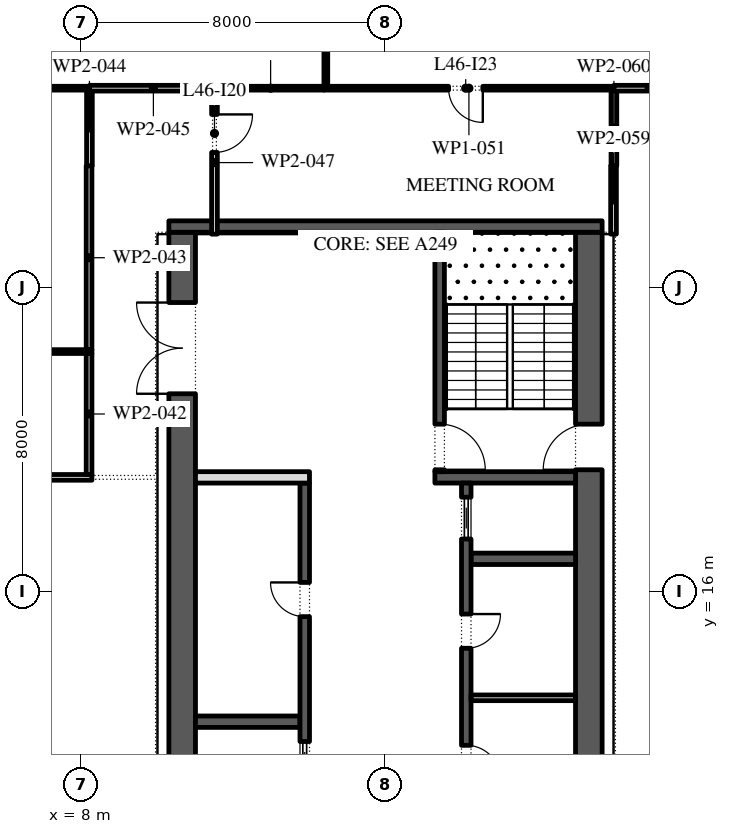
"""IFC4 building model, lengths in metres.
Left out: names, types, materials, properties, quantities, classifications, styles, units other than length and angle.
Written with IfcOpenShell. Run it as: python <this file> out.ifc"""

import sys

from ifc_helpers import new_model, si_unit, direction, frame, frame_2d, origin, place, context, subcontext, project, spatial, rectangle, extrude, element, fill, save


model = new_model("IFC4")
c1 = context("Model", 3, precision=1e-05, world=origin(), true_north=direction((0.0, 1.0)))
c2 = subcontext(c1, "Body", "Model", "MODEL_VIEW")
j1 = project(units=[si_unit("LENGTHUNIT", "METRE"), si_unit("PLANEANGLEUNIT", "RADIAN")], contexts=[c1])
p1 = place(None, origin())
s1 = spatial("IfcSite", under=j1, at=p1, CompositionType="ELEMENT")
p2 = place(p1, origin())
s2 = spatial("IfcBuilding", under=s1, at=p2, CompositionType="ELEMENT")
p3 = place(p2, frame((0.0, 0.0, 209.4)))
s3 = spatial("IfcBuildingStorey", under=s2, at=p3, CompositionType="ELEMENT", Elevation=209.4)
p4 = place(p3, frame((33.157, -5.092, 0.0), z_axis=(0.0, 0.0, 1.0), x_axis=(-0.224950279389, 0.974370243697, 0.0)))
e1 = element("IfcWall", 1, at=p4, inside=s3, PredefinedType="STANDARD", context=c2, shape_type="SweptSolid", body=[
    extrude(rectangle(XDim=49.5, YDim=0.3, at=frame_2d((24.75, 0.0))), origin(), (0.0, 0.0, 1.0), 4.0),
])
p5 = place(p4, frame((2.207, 0.0, 0.0)))
e2 = element("IfcOpeningElement", 2, at=p5, cuts=e1, PredefinedType="OPENING", context=c2, shape_type="SweptSolid", body=[
    extrude(rectangle(XDim=2.4, YDim=3.125, at=frame_2d((1.2, 1.562))), frame((0.0, 0.16, 0.0), z_axis=(0.0, -1.0, 0.0), x_axis=(1.0, 0.0, 0.0)), (0.0, 0.0, 1.0), 0.32),
])
p6 = place(p4, frame((8.121, 0.0, 0.45)))
e3 = element("IfcOpeningElement", 3, at=p6, cuts=e1, PredefinedType="OPENING", context=c2, shape_type="SweptSolid", body=[
    extrude(rectangle(XDim=4.5, YDim=2.875, at=frame_2d((2.25, 1.438))), frame((0.0, 0.16, 0.0), z_axis=(0.0, -1.0, 0.0), x_axis=(1.0, 0.0, 0.0)), (0.0, 0.0, 1.0), 0.32),
])
p7 = place(p4, frame((15.236, 0.0, 0.45)))
e4 = element("IfcOpeningElement", 4, at=p7, cuts=e1, PredefinedType="OPENING", context=c2, shape_type="SweptSolid", body=[
    extrude(rectangle(XDim=4.5, YDim=2.875, at=frame_2d((2.25, 1.438))), frame((0.0, 0.16, 0.0), z_axis=(0.0, -1.0, 0.0), x_axis=(1.0, 0.0, 0.0)), (0.0, 0.0, 1.0), 0.32),
])
p8 = place(p4, frame((22.35, 0.0, 0.45)))
e5 = element("IfcOpeningElement", 5, at=p8, cuts=e1, PredefinedType="OPENING", context=c2, shape_type="SweptSolid", body=[
    extrude(rectangle(XDim=4.5, YDim=3.0, at=frame_2d((2.25, 1.5))), frame((0.0, 0.16, 0.0), z_axis=(0.0, -1.0, 0.0), x_axis=(1.0, 0.0, 0.0)), (0.0, 0.0, 1.0), 0.32),
])
p9 = place(p4, frame((30.514, 0.0, 0.0)))
e6 = element("IfcOpeningElement", 6, at=p9, cuts=e1, PredefinedType="OPENING", context=c2, shape_type="SweptSolid", body=[
    extrude(rectangle(XDim=2.4, YDim=3.45, at=frame_2d((1.2, 1.725))), frame((0.0, 0.16, 0.0), z_axis=(0.0, -1.0, 0.0), x_axis=(1.0, 0.0, 0.0)), (0.0, 0.0, 1.0), 0.32),
])
p10 = place(p4, frame((36.579, 0.0, 0.45)))
e7 = element("IfcOpeningElement", 7, at=p10, cuts=e1, PredefinedType="OPENING", context=c2, shape_type="SweptSolid", body=[
    extrude(rectangle(XDim=4.5, YDim=3.05, at=frame_2d((2.25, 1.525))), frame((0.0, 0.16, 0.0), z_axis=(0.0, -1.0, 0.0), x_axis=(1.0, 0.0, 0.0)), (0.0, 0.0, 1.0), 0.32),
])
p11 = place(p4, frame((43.693, 0.0, 0.45)))
e8 = element("IfcOpeningElement", 8, at=p11, cuts=e1, PredefinedType="OPENING", context=c2, shape_type="SweptSolid", body=[
    extrude(rectangle(XDim=4.5, YDim=3.05, at=frame_2d((2.25, 1.525))), frame((0.0, 0.16, 0.0), z_axis=(0.0, -1.0, 0.0), x_axis=(1.0, 0.0, 0.0)), (0.0, 0.0, 1.0), 0.32),
])
p12 = place(p3, frame((21.35, -2.45, 0.0), z_axis=(0.0, 0.0, 1.0), x_axis=(0.0, 1.0, 0.0)))
e9 = element("IfcWall", 9, at=p12, inside=s3, PredefinedType="SHEAR", context=c2, shape_type="SweptSolid", body=[
    extrude(rectangle(XDim=27.9, YDim=0.7, at=frame_2d((13.95, 0.0))), origin(), (0.0, 0.0, 1.0), 4.0),
])
p13 = place(p12, frame((5.05, 0.0, 0.0)))
e10 = element("IfcOpeningElement", 10, at=p13, cuts=e9, PredefinedType="OPENING", context=c2, shape_type="SweptSolid", body=[
    extrude(rectangle(XDim=1.2, YDim=2.1, at=frame_2d((0.6, 1.05))), frame((0.0, 0.36, 0.0), z_axis=(0.0, -1.0, 0.0), x_axis=(1.0, 0.0, 0.0)), (0.0, 0.0, 1.0), 0.72),
])
p14 = place(p12, frame((21.65, 0.0, 0.0)))
e11 = element("IfcOpeningElement", 11, at=p14, cuts=e9, PredefinedType="OPENING", context=c2, shape_type="SweptSolid", body=[
    extrude(rectangle(XDim=1.2, YDim=2.1, at=frame_2d((0.6, 1.05))), frame((0.0, 0.36, 0.0), z_axis=(0.0, -1.0, 0.0), x_axis=(1.0, 0.0, 0.0)), (0.0, 0.0, 1.0), 0.72),
])
p15 = place(p3, frame((10.65, -2.45, 0.0), z_axis=(0.0, 0.0, 1.0), x_axis=(0.0, 1.0, 0.0)))
e12 = element("IfcWall", 12, at=p15, inside=s3, PredefinedType="SHEAR", context=c2, shape_type="SweptSolid", body=[
    extrude(rectangle(XDim=27.9, YDim=0.7, at=frame_2d((13.95, 0.0))), origin(), (0.0, 0.0, 1.0), 4.0),
])
p16 = place(p15, frame((23.65, 0.0, 0.0)))
e13 = element("IfcOpeningElement", 13, at=p16, cuts=e12, PredefinedType="OPENING", context=c2, shape_type="SweptSolid", body=[
    extrude(rectangle(XDim=2.4, YDim=2.1, at=frame_2d((1.2, 1.05))), frame((0.0, 0.36, 0.0), z_axis=(0.0, -1.0, 0.0), x_axis=(1.0, 0.0, 0.0)), (0.0, 0.0, 1.0), 0.72),
])
p17 = place(p15, frame((1.387, 0.0, 0.0)))
e14 = element("IfcOpeningElement", 14, at=p17, cuts=e12, PredefinedType="OPENING", context=c2, shape_type="SweptSolid", body=[
    extrude(rectangle(XDim=0.9, YDim=2.1, at=frame_2d((0.45, 1.05))), frame((0.0, 0.36, 0.0), z_axis=(0.0, -1.0, 0.0), x_axis=(1.0, 0.0, 0.0)), (0.0, 0.0, 1.0), 0.72),
])
p18 = place(p15, frame((4.562, 0.0, 0.0)))
e15 = element("IfcOpeningElement", 15, at=p18, cuts=e12, PredefinedType="OPENING", context=c2, shape_type="SweptSolid", body=[
    extrude(rectangle(XDim=1.0, YDim=2.1, at=frame_2d((0.5, 1.05))), frame((0.0, 0.36, 0.0), z_axis=(0.0, -1.0, 0.0), x_axis=(1.0, 0.0, 0.0)), (0.0, 0.0, 1.0), 0.72),
])
p19 = place(p3, frame((10.3, 25.6, 0.0), z_axis=(0.0, 0.0, 1.0), x_axis=(1.0, 0.0, 0.0)))
e16 = element("IfcWall", 16, at=p19, inside=s3, PredefinedType="SHEAR", context=c2, shape_type="SweptSolid", body=[
    extrude(rectangle(XDim=11.4, YDim=0.3, at=frame_2d((5.7, 0.0))), origin(), (0.0, 0.0, 1.0), 4.0),
])
p20 = place(p3, frame((17.3, 19.0, 0.0), z_axis=(0.0, 0.0, 1.0), x_axis=(1.0, 0.0, 0.0)))
e17 = element("IfcWall", 17, at=p20, inside=s3, PredefinedType="SHEAR", context=c2, shape_type="SweptSolid", body=[
    extrude(rectangle(XDim=3.7, YDim=0.3, at=frame_2d((1.85, 0.0))), origin(), (0.0, 0.0, 1.0), 4.0),
])
p21 = place(p3, frame((17.425, 19.15, 0.0), z_axis=(0.0, 0.0, 1.0), x_axis=(0.0, 1.0, 0.0)))
e18 = element("IfcWall", 18, at=p21, inside=s3, PredefinedType="SHEAR", context=c2, shape_type="SweptSolid", body=[
    extrude(rectangle(XDim=6.3, YDim=0.25, at=frame_2d((3.15, 0.0))), origin(), (0.0, 0.0, 1.0), 4.0),
])
p22 = place(p21, frame((0.05, 0.0, 0.0)))
e19 = element("IfcOpeningElement", 19, at=p22, cuts=e18, PredefinedType="OPENING", context=c2, shape_type="SweptSolid", body=[
    extrude(rectangle(XDim=1.2, YDim=2.1, at=frame_2d((0.6, 1.05))), frame((0.0, 0.135, 0.0), z_axis=(0.0, -1.0, 0.0), x_axis=(1.0, 0.0, 0.0)), (0.0, 0.0, 1.0), 0.27),
])
p23 = place(p3, frame((18.25, 16.857, 0.0), z_axis=(0.0, 0.0, 1.0), x_axis=(1.0, 0.0, 0.0)))
e20 = element("IfcWall", 20, at=p23, inside=s3, PredefinedType="SHEAR", context=c2, shape_type="SweptSolid", body=[
    extrude(rectangle(XDim=2.75, YDim=0.3, at=frame_2d((1.375, 0.0))), origin(), (0.0, 0.0, 1.0), 4.0),
])
p24 = place(p3, frame((18.125, 4.15, 0.0), z_axis=(0.0, 0.0, 1.0), x_axis=(0.0, 1.0, 0.0)))
e21 = element("IfcWall", 21, at=p24, inside=s3, PredefinedType="SHEAR", context=c2, shape_type="SweptSolid", body=[
    extrude(rectangle(XDim=14.7, YDim=0.25, at=frame_2d((7.35, 0.0))), origin(), (0.0, 0.0, 1.0), 4.0),
])
p25 = place(p24, frame((3.446, 0.0, 0.0)))
e22 = element("IfcOpeningElement", 22, at=p25, cuts=e21, PredefinedType="OPENING", context=c2, shape_type="SweptSolid", body=[
    extrude(rectangle(XDim=0.9, YDim=2.1, at=frame_2d((0.45, 1.05))), frame((0.0, 0.135, 0.0), z_axis=(0.0, -1.0, 0.0), x_axis=(1.0, 0.0, 0.0)), (0.0, 0.0, 1.0), 0.27),
])
p26 = place(p24, frame((6.9, 0.0, 0.0)))
e23 = element("IfcOpeningElement", 23, at=p26, cuts=e21, PredefinedType="OPENING", context=c2, shape_type="SweptSolid", body=[
    extrude(rectangle(XDim=0.9, YDim=2.1, at=frame_2d((0.45, 1.05))), frame((0.0, 0.135, 0.0), z_axis=(0.0, -1.0, 0.0), x_axis=(1.0, 0.0, 0.0)), (0.0, 0.0, 1.0), 0.27),
])
p27 = place(p24, frame((10.354, 0.0, 0.0)))
e24 = element("IfcOpeningElement", 24, at=p27, cuts=e21, PredefinedType="OPENING", context=c2, shape_type="SweptSolid", body=[
    extrude(rectangle(XDim=0.9, YDim=2.1, at=frame_2d((0.45, 1.05))), frame((0.0, 0.135, 0.0), z_axis=(0.0, -1.0, 0.0), x_axis=(1.0, 0.0, 0.0)), (0.0, 0.0, 1.0), 0.27),
])
p28 = place(p24, frame((0.371, 0.0, 0.0)))
e25 = element("IfcOpeningElement", 25, at=p28, cuts=e21, PredefinedType="OPENING", context=c2, shape_type="SweptSolid", body=[
    extrude(rectangle(XDim=1.1, YDim=2.1, at=frame_2d((0.55, 1.05))), frame((0.0, 0.135, 0.0), z_axis=(0.0, -1.0, 0.0), x_axis=(1.0, 0.0, 0.0)), (0.0, 0.0, 1.0), 0.27),
])
p29 = place(p24, frame((13.229, 0.0, 0.0)))
e26 = element("IfcOpeningElement", 26, at=p29, cuts=e21, PredefinedType="OPENING", context=c2, shape_type="SweptSolid", body=[
    extrude(rectangle(XDim=1.1, YDim=2.1, at=frame_2d((0.55, 1.05))), frame((0.0, 0.135, 0.0), z_axis=(0.0, -1.0, 0.0), x_axis=(1.0, 0.0, 0.0)), (0.0, 0.0, 1.0), 0.27),
])
p30 = place(p3, frame((18.25, 13.2, 0.0), z_axis=(0.0, 0.0, 1.0), x_axis=(1.0, 0.0, 0.0)))
e27 = element("IfcWall", 27, at=p30, inside=s3, PredefinedType="PARTITIONING", context=c2, shape_type="SweptSolid", body=[
    extrude(rectangle(XDim=2.75, YDim=0.15, at=frame_2d((1.375, 0.0))), origin(), (0.0, 0.0, 1.0), 4.0),
])
p31 = place(p3, frame((11.0, 12.571, 0.0), z_axis=(0.0, 0.0, 1.0), x_axis=(1.0, 0.0, 0.0)))
e28 = element("IfcWall", 28, at=p31, inside=s3, PredefinedType="SHEAR", context=c2, shape_type="SweptSolid", body=[
    extrude(rectangle(XDim=2.75, YDim=0.3, at=frame_2d((1.375, 0.0))), origin(), (0.0, 0.0, 1.0), 4.0),
])
p32 = place(p3, frame((13.875, -2.45, 0.0), z_axis=(0.0, 0.0, 1.0), x_axis=(0.0, 1.0, 0.0)))
e29 = element("IfcWall", 29, at=p32, inside=s3, PredefinedType="SHEAR", context=c2, shape_type="SweptSolid", body=[
    extrude(rectangle(XDim=21.3, YDim=0.25, at=frame_2d((10.65, 0.0))), origin(), (0.0, 0.0, 1.0), 4.0),
])
p33 = place(p32, frame((17.786, 0.0, 0.0)))
e30 = element("IfcOpeningElement", 30, at=p33, cuts=e29, PredefinedType="OPENING", context=c2, shape_type="SweptSolid", body=[
    extrude(rectangle(XDim=0.9, YDim=2.1, at=frame_2d((0.45, 1.05))), frame((0.0, 0.135, 0.0), z_axis=(0.0, -1.0, 0.0), x_axis=(1.0, 0.0, 0.0)), (0.0, 0.0, 1.0), 0.27),
])
p34 = place(p32, frame((6.971, 0.0, 0.0)))
e31 = element("IfcOpeningElement", 31, at=p34, cuts=e29, PredefinedType="OPENING", context=c2, shape_type="SweptSolid", body=[
    extrude(rectangle(XDim=1.1, YDim=2.1, at=frame_2d((0.55, 1.05))), frame((0.0, 0.135, 0.0), z_axis=(0.0, -1.0, 0.0), x_axis=(1.0, 0.0, 0.0)), (0.0, 0.0, 1.0), 0.27),
])
p35 = place(p32, frame((9.114, 0.0, 0.0)))
e32 = element("IfcOpeningElement", 32, at=p35, cuts=e29, PredefinedType="OPENING", context=c2, shape_type="SweptSolid", body=[
    extrude(rectangle(XDim=1.1, YDim=2.1, at=frame_2d((0.55, 1.05))), frame((0.0, 0.135, 0.0), z_axis=(0.0, -1.0, 0.0), x_axis=(1.0, 0.0, 0.0)), (0.0, 0.0, 1.0), 0.27),
])
p36 = place(p32, frame((11.257, 0.0, 0.0)))
e33 = element("IfcOpeningElement", 33, at=p36, cuts=e29, PredefinedType="OPENING", context=c2, shape_type="SweptSolid", body=[
    extrude(rectangle(XDim=1.1, YDim=2.1, at=frame_2d((0.55, 1.05))), frame((0.0, 0.135, 0.0), z_axis=(0.0, -1.0, 0.0), x_axis=(1.0, 0.0, 0.0)), (0.0, 0.0, 1.0), 0.27),
])
p37 = place(p32, frame((13.4, 0.0, 0.0)))
e34 = element("IfcOpeningElement", 34, at=p37, cuts=e29, PredefinedType="OPENING", context=c2, shape_type="SweptSolid", body=[
    extrude(rectangle(XDim=1.1, YDim=2.1, at=frame_2d((0.55, 1.05))), frame((0.0, 0.135, 0.0), z_axis=(0.0, -1.0, 0.0), x_axis=(1.0, 0.0, 0.0)), (0.0, 0.0, 1.0), 0.27),
])
p38 = place(p3, frame((11.0, 19.0, 0.0), z_axis=(0.0, 0.0, 1.0), x_axis=(1.0, 0.0, 0.0)))
e35 = element("IfcWall", 35, at=p38, inside=s3, PredefinedType="PARTITIONING", context=c2, shape_type="SweptSolid", body=[
    extrude(rectangle(XDim=3.0, YDim=0.3, at=frame_2d((1.5, 0.0))), origin(), (0.0, 0.0, 1.0), 4.0),
])
p39 = place(p3, frame((0.915, 19.0, 0.0), z_axis=(0.0, 0.0, 1.0), x_axis=(1.0, 0.0, 0.0)))
e36 = element("IfcWall", 36, at=p39, inside=s3, PredefinedType="PARTITIONING", context=c2, shape_type="SweptSolid", body=[
    extrude(rectangle(XDim=7.36, YDim=0.15, at=frame_2d((3.68, 0.0))), origin(), (0.0, 0.0, 1.0), 4.0),
])
p40 = place(p39, frame((2.385, 0.0, 0.0)))
e37 = element("IfcOpeningElement", 37, at=p40, cuts=e36, PredefinedType="OPENING", context=c2, shape_type="SweptSolid", body=[
    extrude(rectangle(XDim=1.0, YDim=2.1, at=frame_2d((0.5, 1.05))), frame((0.0, 0.085, 0.0), z_axis=(0.0, -1.0, 0.0), x_axis=(1.0, 0.0, 0.0)), (0.0, 0.0, 1.0), 0.17),
])
p41 = place(p3, frame((1.065, 22.31, 0.0), z_axis=(0.0, 0.0, 1.0), x_axis=(1.0, 0.0, 0.0)))
e38 = element("IfcWall", 38, at=p41, inside=s3, PredefinedType="PARTITIONING", context=c2, shape_type="SweptSolid", body=[
    extrude(rectangle(XDim=7.21, YDim=0.1, at=frame_2d((3.605, 0.0))), origin(), (0.0, 0.0, 1.0), 4.0),
])
p42 = place(p3, frame((1.065, 29.24, 0.0), z_axis=(0.0, 0.0, 1.0), x_axis=(1.0, 0.0, 0.0)))
e39 = element("IfcWall", 39, at=p42, inside=s3, PredefinedType="PARTITIONING", context=c2, shape_type="SweptSolid", body=[
    extrude(rectangle(XDim=7.145, YDim=0.1, at=frame_2d((3.573, 0.0))), origin(), (0.0, 0.0, 1.0), 4.0),
])
p43 = place(p3, frame((8.2, 19.075, 0.0), z_axis=(0.0, 0.0, 1.0), x_axis=(0.0, 1.0, 0.0)))
e40 = element("IfcWall", 40, at=p43, inside=s3, PredefinedType="PARTITIONING", context=c2, shape_type="SweptSolid", body=[
    extrude(rectangle(XDim=3.185, YDim=0.15, at=frame_2d((1.593, 0.0))), origin(), (0.0, 0.0, 1.0), 4.0),
])
p44 = place(p3, frame((8.2, 22.36, 0.0), z_axis=(0.0, 0.0, 1.0), x_axis=(0.0, 1.0, 0.0)))
e41 = element("IfcWall", 41, at=p44, inside=s3, PredefinedType="PARTITIONING", context=c2, shape_type="SweptSolid", body=[
    extrude(rectangle(XDim=4.84, YDim=0.15, at=frame_2d((2.42, 0.0))), origin(), (0.0, 0.0, 1.0), 4.0),
])
p45 = place(p3, frame((8.21, 27.2, 0.0), z_axis=(0.0, 0.0, 1.0), x_axis=(0.0, 1.0, 0.0)))
e42 = element("IfcWall", 42, at=p45, inside=s3, PredefinedType="PARTITIONING", context=c2, shape_type="SweptSolid", body=[
    extrude(rectangle(XDim=1.99, YDim=0.15, at=frame_2d((0.995, 0.0))), origin(), (0.0, 0.0, 1.0), 4.0),
])
p46 = place(p3, frame((8.21, 29.24, 0.0), z_axis=(0.0, 0.0, 1.0), x_axis=(1.0, 0.0, 0.0)))
e43 = element("IfcWall", 43, at=p46, inside=s3, PredefinedType="PARTITIONING", context=c2, shape_type="SweptSolid", body=[
    extrude(rectangle(XDim=3.365, YDim=0.15, at=frame_2d((1.683, 0.0))), origin(), (0.0, 0.0, 1.0), 4.0),
])
p47 = place(p3, frame((11.5, 29.165, 0.0), z_axis=(0.0, 0.0, 1.0), x_axis=(0.0, -1.0, 0.0)))
e44 = element("IfcWall", 44, at=p47, inside=s3, PredefinedType="PARTITIONING", context=c2, shape_type="SweptSolid", body=[
    extrude(rectangle(XDim=3.765, YDim=0.15, at=frame_2d((1.883, 0.0))), origin(), (0.0, 0.0, 1.0), 4.0),
])
p48 = place(p47, frame((0.615, 0.0, 0.0)))
e45 = element("IfcOpeningElement", 45, at=p48, cuts=e44, PredefinedType="OPENING", context=c2, shape_type="SweptSolid", body=[
    extrude(rectangle(XDim=1.0, YDim=2.1, at=frame_2d((0.5, 1.05))), frame((0.0, 0.085, 0.0), z_axis=(0.0, -1.0, 0.0), x_axis=(1.0, 0.0, 0.0)), (0.0, 0.0, 1.0), 0.17),
])
p49 = place(p3, frame((11.575, 29.24, 0.0), z_axis=(0.0, 0.0, 1.0), x_axis=(1.0, 0.0, 0.0)))
e46 = element("IfcWall", 46, at=p49, inside=s3, PredefinedType="PARTITIONING", context=c2, shape_type="SweptSolid", body=[
    extrude(rectangle(XDim=2.805, YDim=0.1, at=frame_2d((1.402, 0.0))), origin(), (0.0, 0.0, 1.0), 4.0),
])
p50 = place(p3, frame((14.38, 29.24, 0.0), z_axis=(0.0, 0.0, 1.0), x_axis=(1.0, 0.0, 0.0)))
e47 = element("IfcWall", 47, at=p50, inside=s3, PredefinedType="PARTITIONING", context=c2, shape_type="SweptSolid", body=[
    extrude(rectangle(XDim=7.63, YDim=0.1, at=frame_2d((3.815, 0.0))), origin(), (0.0, 0.0, 1.0), 4.0),
])
p51 = place(p50, frame((3.28, 0.0, 0.0)))
e48 = element("IfcOpeningElement", 48, at=p51, cuts=e47, PredefinedType="OPENING", context=c2, shape_type="SweptSolid", body=[
    extrude(rectangle(XDim=0.9, YDim=2.1, at=frame_2d((0.45, 1.05))), frame((0.0, 0.06, 0.0), z_axis=(0.0, -1.0, 0.0), x_axis=(1.0, 0.0, 0.0)), (0.0, 0.0, 1.0), 0.12),
])
p52 = place(p3, frame((14.43, 36.22, 0.0), z_axis=(0.0, 0.0, 1.0), x_axis=(0.0, -1.0, 0.0)))
e49 = element("IfcWall", 49, at=p52, inside=s3, PredefinedType="PARTITIONING", context=c2, shape_type="SweptSolid", body=[
    extrude(rectangle(XDim=6.93, YDim=0.1, at=frame_2d((3.465, 0.0))), origin(), (0.0, 0.0, 1.0), 4.0),
])
p53 = place(p3, frame((22.0, 25.4, 0.0), z_axis=(0.0, 0.0, 1.0), x_axis=(0.0, 1.0, 0.0)))
e50 = element("IfcWall", 50, at=p53, inside=s3, PredefinedType="PARTITIONING", context=c2, shape_type="SweptSolid", body=[
    extrude(rectangle(XDim=1.8, YDim=0.15, at=frame_2d((0.9, 0.0))), origin(), (0.0, 0.0, 1.0), 4.0),
])
p54 = place(p3, frame((22.01, 27.2, 0.0), z_axis=(0.0, 0.0, 1.0), x_axis=(0.0, 1.0, 0.0)))
e51 = element("IfcWall", 51, at=p54, inside=s3, PredefinedType="PARTITIONING", context=c2, shape_type="SweptSolid", body=[
    extrude(rectangle(XDim=1.99, YDim=0.15, at=frame_2d((0.995, 0.0))), origin(), (0.0, 0.0, 1.0), 4.0),
])
p55 = place(p3, frame((22.01, 29.24, 0.0), z_axis=(0.0, 0.0, 1.0), x_axis=(1.0, 0.0, 0.0)))
e52 = element("IfcWall", 52, at=p55, inside=s3, PredefinedType="PARTITIONING", context=c2, shape_type="SweptSolid", body=[
    extrude(rectangle(XDim=1.855, YDim=0.15, at=frame_2d((0.927, 0.0))), origin(), (0.0, 0.0, 1.0), 4.0),
])
p56 = place(p26, frame((0.9, -0.2, 0.0), z_axis=(0.0, 0.0, 1.0), x_axis=(-1.0, 0.0, 0.0)))
e53 = element("IfcDoor", 53, at=p56, inside=s3, OperationType="SINGLE_SWING_LEFT", PredefinedType="DOOR", context=c2, shape_type="SweptSolid", body=[
    extrude(rectangle(XDim=0.9, YDim=2.1, at=frame_2d((0.45, 1.05))), frame((0.0, -0.075, 0.0), z_axis=(0.0, -1.0, 0.0), x_axis=(1.0, 0.0, 0.0)), (0.0, 0.0, 1.0), 0.05),
])
fill(e23, e53)
p57 = place(p27, frame((0.9, -0.2, 0.0), z_axis=(0.0, 0.0, 1.0), x_axis=(-1.0, 0.0, 0.0)))
e54 = element("IfcDoor", 54, at=p57, inside=s3, OperationType="SINGLE_SWING_RIGHT", PredefinedType="DOOR", context=c2, shape_type="SweptSolid", body=[
    extrude(rectangle(XDim=0.9, YDim=2.1, at=frame_2d((0.45, 1.05))), frame((0.0, -0.075, 0.0), z_axis=(0.0, -1.0, 0.0), x_axis=(1.0, 0.0, 0.0)), (0.0, 0.0, 1.0), 0.05),
])
fill(e24, e54)
p58 = place(p29, origin())
e55 = element("IfcDoor", 55, at=p58, inside=s3, OperationType="SLIDING_TO_LEFT", PredefinedType="DOOR", context=c2, shape_type="SweptSolid", body=[
    extrude(rectangle(XDim=1.1, YDim=2.1, at=frame_2d((0.55, 1.05))), frame((0.0, 0.025, 0.0), z_axis=(0.0, -1.0, 0.0), x_axis=(1.0, 0.0, 0.0)), (0.0, 0.0, 1.0), 0.05),
])
fill(e26, e55)
p59 = place(p33, origin())
e56 = element("IfcDoor", 56, at=p59, inside=s3, OperationType="SINGLE_SWING_LEFT", PredefinedType="DOOR", context=c2, shape_type="SweptSolid", body=[
    extrude(rectangle(XDim=0.9, YDim=2.1, at=frame_2d((0.45, 1.05))), frame((0.0, 0.125, 0.0), z_axis=(0.0, -1.0, 0.0), x_axis=(1.0, 0.0, 0.0)), (0.0, 0.0, 1.0), 0.05),
])
fill(e30, e56)
p60 = place(p37, origin())
e57 = element("IfcDoor", 57, at=p60, inside=s3, OperationType="SLIDING_TO_LEFT", PredefinedType="DOOR", context=c2, shape_type="SweptSolid", body=[
    extrude(rectangle(XDim=1.1, YDim=2.1, at=frame_2d((0.55, 1.05))), frame((0.0, 0.025, 0.0), z_axis=(0.0, -1.0, 0.0), x_axis=(1.0, 0.0, 0.0)), (0.0, 0.0, 1.0), 0.05),
])
fill(e34, e57)
p61 = place(p16, origin())
e58 = element("IfcDoor", 58, at=p61, inside=s3, OperationType="DOUBLE_DOOR_SINGLE_SWING", PredefinedType="DOOR", context=c2, shape_type="SweptSolid", body=[
    extrude(rectangle(XDim=2.4, YDim=2.1, at=frame_2d((1.2, 1.05))), frame((0.0, 0.025, 0.0), z_axis=(0.0, -1.0, 0.0), x_axis=(1.0, 0.0, 0.0)), (0.0, 0.0, 1.0), 0.05),
])
fill(e13, e58)
p62 = place(p22, frame((1.2, 0.0, 0.0), z_axis=(0.0, 0.0, 1.0), x_axis=(-1.0, 0.0, 0.0)))
e59 = element("IfcDoor", 59, at=p62, inside=s3, OperationType="SINGLE_SWING_LEFT", PredefinedType="DOOR", context=c2, shape_type="SweptSolid", body=[
    extrude(rectangle(XDim=1.2, YDim=2.1, at=frame_2d((0.6, 1.05))), frame((0.0, 0.025, 0.0), z_axis=(0.0, -1.0, 0.0), x_axis=(1.0, 0.0, 0.0)), (0.0, 0.0, 1.0), 0.05),
])
fill(e19, e59)
p63 = place(p14, origin())
e60 = element("IfcDoor", 60, at=p63, inside=s3, OperationType="SINGLE_SWING_RIGHT", PredefinedType="DOOR", context=c2, shape_type="SweptSolid", body=[
    extrude(rectangle(XDim=1.2, YDim=2.1, at=frame_2d((0.6, 1.05))), frame((0.0, 0.025, 0.0), z_axis=(0.0, -1.0, 0.0), x_axis=(1.0, 0.0, 0.0)), (0.0, 0.0, 1.0), 0.05),
])
fill(e11, e60)
p64 = place(p48, origin())
e61 = element("IfcDoor", 61, at=p64, inside=s3, OperationType="SINGLE_SWING_RIGHT", PredefinedType="DOOR", context=c2, shape_type="SweptSolid", body=[
    extrude(rectangle(XDim=1.0, YDim=2.1, at=frame_2d((0.5, 1.05))), frame((0.0, 0.025, 0.0), z_axis=(0.0, -1.0, 0.0), x_axis=(1.0, 0.0, 0.0)), (0.0, 0.0, 1.0), 0.05),
])
fill(e45, e61)
p65 = place(p51, frame((0.9, 0.0, 0.0), z_axis=(0.0, 0.0, 1.0), x_axis=(-1.0, 0.0, 0.0)))
e62 = element("IfcDoor", 62, at=p65, inside=s3, OperationType="SINGLE_SWING_RIGHT", PredefinedType="DOOR", context=c2, shape_type="SweptSolid", body=[
    extrude(rectangle(XDim=0.9, YDim=2.1, at=frame_2d((0.45, 1.05))), frame((0.0, 0.025, 0.0), z_axis=(0.0, -1.0, 0.0), x_axis=(1.0, 0.0, 0.0)), (0.0, 0.0, 1.0), 0.05),
])
fill(e48, e62)
save(model, sys.argv[1])
